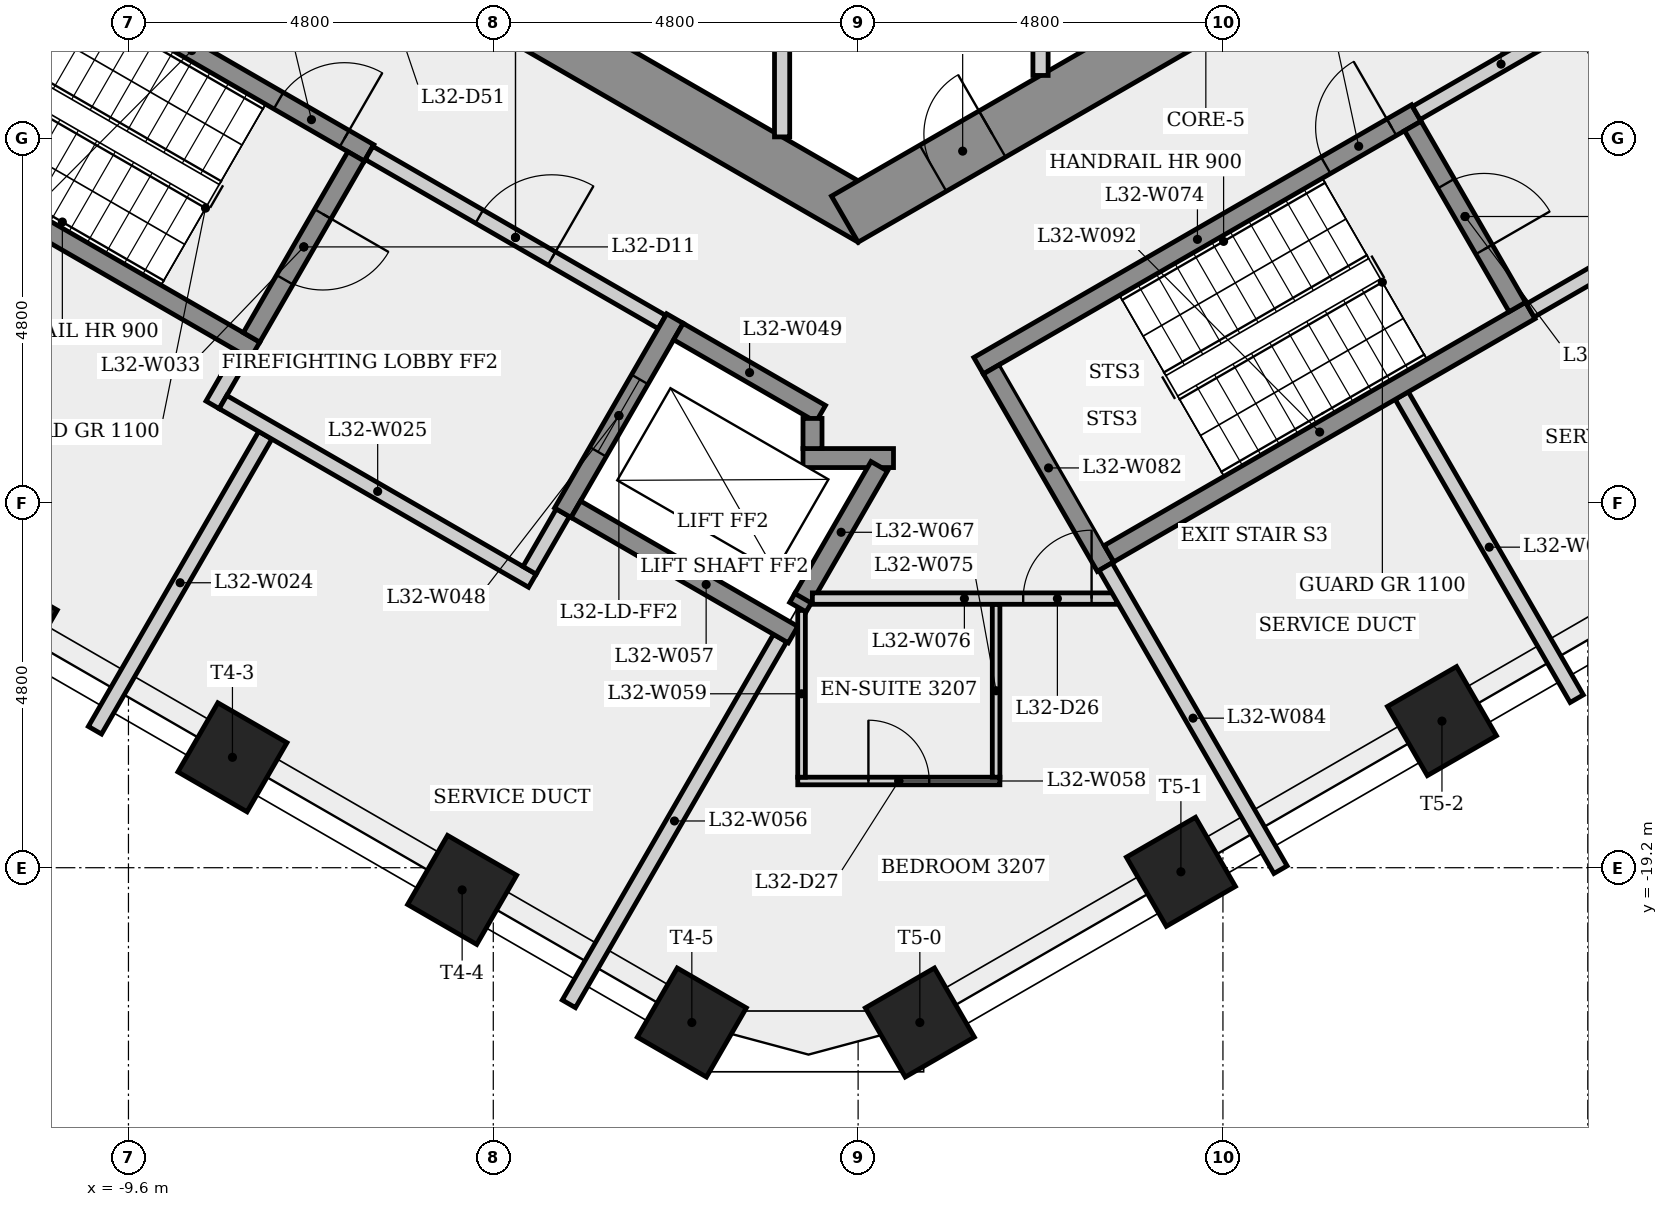
"""IFC4 building model, lengths in metres.
Left out: names, types, materials, properties, quantities, classifications, styles, units other than length and angle.
Written with IfcOpenShell. Run it as: python <this file> out.ifc"""

import sys

from ifc_helpers import new_model, si_unit, direction, frame, frame_2d, origin, origin_2d, place, context, subcontext, project, spatial, rectangle, extrude, element, fill, save


model = new_model("IFC4")
c1 = context("Model", 3, precision=1e-05, world=origin(), true_north=direction((0.0, 1.0)))
c2 = subcontext(c1, "Body", "Model", "MODEL_VIEW")
j1 = project(units=[si_unit("LENGTHUNIT", "METRE"), si_unit("PLANEANGLEUNIT", "RADIAN")], contexts=[c1])
p1 = place(None, origin())
s1 = spatial("IfcSite", under=j1, at=p1, CompositionType="ELEMENT")
p2 = place(p1, origin())
s2 = spatial("IfcBuilding", under=s1, at=p2, CompositionType="ELEMENT")
p3 = place(p2, frame((0.0, 0.0, 120.5)))
s3 = spatial("IfcBuildingStorey", under=s2, at=p3, CompositionType="ELEMENT", Elevation=120.5)
p4 = place(p3, frame((-9.325, -5.182, 0.0), z_axis=(0.0, 0.0, 1.0), x_axis=(0.866023993627, -0.500002442456, 0.0)))
e1 = element("IfcWall", 1, at=p4, inside=s3, PredefinedType="SHEAR", context=c2, shape_type="SweptSolid", body=[
    extrude(rectangle(XDim=10.97, YDim=0.7, at=frame_2d((5.485, 0.0))), origin(), (0.0, 0.0, 1.0), 4.0),
])
p5 = place(p4, frame((2.817, 0.0, 0.0)))
e2 = element("IfcOpeningElement", 2, at=p5, cuts=e1, PredefinedType="OPENING", context=c2, shape_type="SweptSolid", body=[
    extrude(rectangle(XDim=0.9, YDim=2.1, at=frame_2d((0.45, 1.05))), frame((0.0, 0.36, 0.0), z_axis=(0.0, -1.0, 0.0), x_axis=(1.0, 0.0, 0.0)), (0.0, 0.0, 1.0), 0.72),
])
p6 = place(p3, frame((-0.175, -10.667, 0.0), z_axis=(0.0, 0.0, 1.0), x_axis=(0.866023993627, 0.500002442456, 0.0)))
e3 = element("IfcWall", 3, at=p6, inside=s3, PredefinedType="SHEAR", context=c2, shape_type="SweptSolid", body=[
    extrude(rectangle(XDim=10.97, YDim=0.7, at=frame_2d((5.485, 0.0))), origin(), (0.0, 0.0, 1.0), 4.0),
])
p7 = place(p6, frame((1.34, 0.0, 0.0)))
e4 = element("IfcOpeningElement", 4, at=p7, cuts=e3, PredefinedType="OPENING", context=c2, shape_type="SweptSolid", body=[
    extrude(rectangle(XDim=0.9, YDim=2.1, at=frame_2d((0.45, 1.05))), frame((0.0, 0.36, 0.0), z_axis=(0.0, -1.0, 0.0), x_axis=(1.0, 0.0, 0.0)), (0.0, 0.0, 1.0), 0.72),
])
p8 = place(p6, frame((8.061, 0.0, 0.0)))
e5 = element("IfcOpeningElement", 5, at=p8, cuts=e3, PredefinedType="OPENING", context=c2, shape_type="SweptSolid", body=[
    extrude(rectangle(XDim=0.9, YDim=2.1, at=frame_2d((0.45, 1.05))), frame((0.0, 0.36, 0.0), z_axis=(0.0, -1.0, 0.0), x_axis=(1.0, 0.0, 0.0)), (0.0, 0.0, 1.0), 0.72),
])
for number, where, z_axis, x_axis in (
    (6, (-11.254, -16.003, 0.0), (0.0, 0.0, 1.0), (-0.5, -0.866, 0.0)),
    (7, (-8.232, -17.747, 0.0), (0.0, 0.0, 1.0), (-0.5, -0.866, 0.0)),
    (8, (-5.21, -19.492, 0.0), (0.0, 0.0, 1.0), (-0.5, -0.866, 0.0)),
    (9, (-2.188, -21.237, 0.0), (0.0, 0.0, 1.0), (-0.5, -0.866, 0.0)),
    (10, (0.812, -21.237, 0.0), (0.0, 0.0, 1.0), (0.5, -0.866, 0.0)),
    (11, (4.247, -19.254, 0.0), (0.0, 0.0, 1.0), (0.5, -0.866, 0.0)),
    (12, (7.682, -17.271, 0.0), (0.0, 0.0, 1.0), (0.5, -0.866, 0.0)),
):
    element("IfcColumn", number, at=place(p3, frame(where, z_axis=z_axis, x_axis=x_axis)), inside=s3, PredefinedType="COLUMN", context=c2, shape_type="SweptSolid", body=[
        extrude(rectangle(XDim=1.05, YDim=1.05, at=origin_2d()), origin(), (0.0, 0.0, 1.0), 4.0),
    ])
p9 = place(p3, frame((-11.1, -7.101, 0.0), z_axis=(0.0, 0.0, 1.0), x_axis=(0.866028615007, -0.499994437958, 0.0)))
e13 = element("IfcWall", 13, at=p9, inside=s3, PredefinedType="SHEAR", context=c2, shape_type="SweptSolid", body=[
    extrude(rectangle(XDim=5.387, YDim=0.25, at=frame_2d((2.694, 0.0))), origin(), (0.0, 0.0, 1.0), 3.6),
])
p10 = place(p9, frame((4.012, 0.0, 0.0)))
e14 = element("IfcOpeningElement", 14, at=p10, cuts=e13, PredefinedType="OPENING", context=c2, shape_type="SweptSolid", body=[
    extrude(rectangle(XDim=1.0, YDim=2.1, at=frame_2d((0.5, 1.05))), frame((0.0, 0.135, 0.0), z_axis=(0.0, -1.0, 0.0), x_axis=(1.0, 0.0, 0.0)), (0.0, 0.0, 1.0), 0.27),
])
p11 = place(p3, frame((-8.493, -13.11, 0.0), z_axis=(0.0, 0.0, 1.0), x_axis=(0.500067724834, 0.865986299303, 0.0)))
e15 = element("IfcWall", 15, at=p11, inside=s3, PredefinedType="PLUMBINGWALL", context=c2, shape_type="SweptSolid", body=[
    extrude(rectangle(XDim=0.775, YDim=0.2, at=frame_2d((0.388, 0.0))), origin(), (0.0, 0.0, 1.0), 3.6),
])
p12 = place(p3, frame((-7.935, -12.393, 0.0), z_axis=(0.0, 0.0, 1.0), x_axis=(-0.866025499775, 0.499999833739, 0.0)))
e16 = element("IfcWall", 16, at=p12, inside=s3, PredefinedType="SHEAR", context=c2, shape_type="SweptSolid", body=[
    extrude(rectangle(XDim=6.4, YDim=0.25, at=frame_2d((3.2, 0.0))), origin(), (0.0, 0.0, 1.0), 3.6),
])
p13 = place(p3, frame((-7.8, -13.51, 0.0), z_axis=(0.0, 0.0, 1.0), x_axis=(-0.499994393058, -0.866028640929, 0.0)))
e17 = element("IfcWall", 17, at=p13, inside=s3, PredefinedType="PLUMBINGWALL", context=c2, shape_type="SweptSolid", body=[
    extrude(rectangle(XDim=4.481, YDim=0.2, at=frame_2d((2.241, 0.0))), origin(), (0.0, 0.0, 1.0), 3.6),
])
p14 = place(p3, frame((-8.356, -13.073, 0.0), z_axis=(0.0, 0.0, 1.0), x_axis=(0.866038532462, -0.499977259774, 0.0)))
e18 = element("IfcWall", 18, at=p14, inside=s3, PredefinedType="PLUMBINGWALL", context=c2, shape_type="SweptSolid", body=[
    extrude(rectangle(XDim=4.7, YDim=0.2, at=frame_2d((2.35, 0.0))), origin(), (0.0, 0.0, 1.0), 3.6),
])
p15 = place(p3, frame((-6.605, -9.841, 0.0), z_axis=(0.0, 0.0, 1.0), x_axis=(-0.499996545922, -0.866027397988, 0.0)))
e19 = element("IfcWall", 19, at=p15, inside=s3, PredefinedType="SHEAR", context=c2, shape_type="SweptSolid", body=[
    extrude(rectangle(XDim=2.75, YDim=0.25, at=frame_2d((1.375, 0.0))), origin(), (0.0, 0.0, 1.0), 3.6),
])
p16 = place(p15, frame((0.875, 0.0, 0.0)))
e20 = element("IfcOpeningElement", 20, at=p16, cuts=e19, PredefinedType="OPENING", context=c2, shape_type="SweptSolid", body=[
    extrude(rectangle(XDim=1.0, YDim=2.1, at=frame_2d((0.5, 1.05))), frame((0.0, 0.135, 0.0), z_axis=(0.0, -1.0, 0.0), x_axis=(1.0, 0.0, 0.0)), (0.0, 0.0, 1.0), 0.27),
])
p17 = place(p3, frame((-6.435, -9.795, 0.0), z_axis=(0.0, 0.0, 1.0), x_axis=(0.866012907634, -0.500021643343, 0.0)))
e21 = element("IfcWall", 21, at=p17, inside=s3, PredefinedType="PARTITIONING", context=c2, shape_type="SweptSolid", body=[
    extrude(rectangle(XDim=4.45, YDim=0.2, at=frame_2d((2.225, 0.0))), origin(), (0.0, 0.0, 1.0), 3.6),
])
p18 = place(p17, frame((1.675, 0.0, 0.0)))
e22 = element("IfcOpeningElement", 22, at=p18, cuts=e21, PredefinedType="OPENING", context=c2, shape_type="SweptSolid", body=[
    extrude(rectangle(XDim=1.1, YDim=2.1, at=frame_2d((0.55, 1.05))), frame((0.0, 0.11, 0.0), z_axis=(0.0, -1.0, 0.0), x_axis=(1.0, 0.0, 0.0)), (0.0, 0.0, 1.0), 0.22),
])
p19 = place(p3, frame((-3.885, -14.529, 0.0), z_axis=(0.0, 0.0, 1.0), x_axis=(-0.499859285417, -0.866106630146, 0.0)))
e23 = element("IfcWall", 23, at=p19, inside=s3, PredefinedType="PLUMBINGWALL", context=c2, shape_type="SweptSolid", body=[
    extrude(rectangle(XDim=0.875, YDim=0.2, at=frame_2d((0.438, 0.0))), origin(), (0.0, 0.0, 1.0), 3.6),
])
p20 = place(p3, frame((-2.41, -11.974, 0.0), z_axis=(0.0, 0.0, 1.0), x_axis=(-0.500001826776, -0.866024349092, 0.0)))
e24 = element("IfcWall", 24, at=p20, inside=s3, PredefinedType="SHEAR", context=c2, shape_type="SweptSolid", body=[
    extrude(rectangle(XDim=2.95, YDim=0.25, at=frame_2d((1.475, 0.0))), origin(), (0.0, 0.0, 1.0), 3.6),
])
p21 = place(p20, frame((0.925, 0.0, 0.0)))
e25 = element("IfcOpeningElement", 25, at=p21, cuts=e24, PredefinedType="OPENING", context=c2, shape_type="SweptSolid", body=[
    extrude(rectangle(XDim=1.1, YDim=2.1, at=frame_2d((0.55, 1.05))), frame((0.0, 0.135, 0.0), z_axis=(0.0, -1.0, 0.0), x_axis=(1.0, 0.0, 0.0)), (0.0, 0.0, 1.0), 0.27),
])
p22 = place(p3, frame((-2.364, -12.145, 0.0), z_axis=(0.0, 0.0, 1.0), x_axis=(0.86603892542, -0.499976579108, 0.0)))
e26 = element("IfcWall", 26, at=p22, inside=s3, PredefinedType="SHEAR", context=c2, shape_type="SweptSolid", body=[
    extrude(rectangle(XDim=2.162, YDim=0.25, at=frame_2d((1.081, 0.0))), origin(), (0.0, 0.0, 1.0), 3.6),
])
p23 = place(p3, frame((-1.0, -5.275, 0.0), z_axis=(0.0, 0.0, 1.0), x_axis=(0.0, -1.0, 0.0)))
e27 = element("IfcWall", 27, at=p23, inside=s3, PredefinedType="PARTITIONING", context=c2, shape_type="SweptSolid", body=[
    extrude(rectangle(XDim=4.309, YDim=0.2, at=frame_2d((2.155, 0.0))), origin(), (0.0, 0.0, 1.0), 3.6),
])
p24 = place(p3, frame((-1.027, -16.179, 0.0), z_axis=(0.0, 0.0, 1.0), x_axis=(-0.499995019066, -0.866028279509, 0.0)))
e28 = element("IfcWall", 28, at=p24, inside=s3, PredefinedType="PLUMBINGWALL", context=c2, shape_type="SweptSolid", body=[
    extrude(rectangle(XDim=5.557, YDim=0.2, at=frame_2d((2.778, 0.0))), origin(), (0.0, 0.0, 1.0), 3.6),
])
p25 = place(p3, frame((-0.856, -16.133, 0.0), z_axis=(0.0, 0.0, 1.0), x_axis=(-0.866021716278, 0.500006386895, 0.0)))
e29 = element("IfcWall", 29, at=p25, inside=s3, PredefinedType="SHEAR", context=c2, shape_type="SweptSolid", body=[
    extrude(rectangle(XDim=3.3, YDim=0.25, at=frame_2d((1.65, 0.0))), origin(), (0.0, 0.0, 1.0), 3.6),
])
p26 = place(p3, frame((-0.794, -18.059, 0.0), z_axis=(0.0, 0.0, 1.0), x_axis=(1.0, 0.0, 0.0)))
e30 = element("IfcWall", 30, at=p26, inside=s3, PredefinedType="PARTITIONING", context=c2, shape_type="SweptSolid", body=[
    extrude(rectangle(XDim=2.66, YDim=0.1, at=frame_2d((1.33, 0.0))), origin(), (0.0, 0.0, 1.0), 3.6),
])
p27 = place(p26, frame((0.93, 0.0, 0.0)))
e31 = element("IfcOpeningElement", 31, at=p27, cuts=e30, PredefinedType="OPENING", context=c2, shape_type="SweptSolid", body=[
    extrude(rectangle(XDim=0.8, YDim=2.1, at=frame_2d((0.4, 1.05))), frame((0.0, 0.06, 0.0), z_axis=(0.0, -1.0, 0.0), x_axis=(1.0, 0.0, 0.0)), (0.0, 0.0, 1.0), 0.12),
])
p28 = place(p3, frame((-0.744, -15.814, 0.0), z_axis=(0.0, 0.0, 1.0), x_axis=(0.0, -1.0, 0.0)))
e32 = element("IfcWall", 32, at=p28, inside=s3, PredefinedType="PARTITIONING", context=c2, shape_type="SweptSolid", body=[
    extrude(rectangle(XDim=2.195, YDim=0.1, at=frame_2d((1.098, 0.0))), origin(), (0.0, 0.0, 1.0), 3.6),
])
p29 = place(p3, frame((-0.719, -15.646, 0.0), z_axis=(0.0, 0.0, 1.0), x_axis=(-0.499915430684, -0.866074224396, 0.0)))
e33 = element("IfcWall", 33, at=p29, inside=s3, PredefinedType="SHEAR", context=c2, shape_type="SweptSolid", body=[
    extrude(rectangle(XDim=0.146, YDim=0.25, at=frame_2d((0.073, 0.0))), origin(), (0.0, 0.0, 1.0), 4.0),
])
p30 = place(p3, frame((-0.725, -13.81, 0.0), z_axis=(0.0, 0.0, 1.0), x_axis=(1.0, 0.0, 0.0)))
e34 = element("IfcWall", 34, at=p30, inside=s3, PredefinedType="SHEAR", context=c2, shape_type="SweptSolid", body=[
    extrude(rectangle(XDim=1.191, YDim=0.25, at=frame_2d((0.595, 0.0))), origin(), (0.0, 0.0, 1.0), 3.6),
])
p31 = place(p3, frame((-0.6, -13.289, 0.0), z_axis=(0.0, 0.0, 1.0), x_axis=(0.0, -1.0, 0.0)))
e35 = element("IfcWall", 35, at=p31, inside=s3, PredefinedType="SHEAR", context=c2, shape_type="SweptSolid", body=[
    extrude(rectangle(XDim=0.396, YDim=0.25, at=frame_2d((0.198, 0.0))), origin(), (0.0, 0.0, 1.0), 4.0),
])
p32 = place(p3, frame((0.278, -13.918, 0.0), z_axis=(0.0, 0.0, 1.0), x_axis=(-0.499936764026, -0.866061910013, 0.0)))
e36 = element("IfcWall", 36, at=p32, inside=s3, PredefinedType="SHEAR", context=c2, shape_type="SweptSolid", body=[
    extrude(rectangle(XDim=2.005, YDim=0.25, at=frame_2d((1.002, 0.0))), origin(), (0.0, 0.0, 1.0), 4.0),
])
p33 = place(p3, frame((1.585, -12.595, 0.0), z_axis=(0.0, 0.0, 1.0), x_axis=(0.866036417653, 0.499980922934, 0.0)))
e37 = element("IfcWall", 37, at=p33, inside=s3, PredefinedType="SHEAR", context=c2, shape_type="SweptSolid", body=[
    extrude(rectangle(XDim=6.65, YDim=0.25, at=frame_2d((3.325, 0.0))), origin(), (0.0, 0.0, 1.0), 3.6),
])
p34 = place(p33, frame((5.275, 0.0, 0.0)))
e38 = element("IfcOpeningElement", 38, at=p34, cuts=e37, PredefinedType="OPENING", context=c2, shape_type="SweptSolid", body=[
    extrude(rectangle(XDim=1.0, YDim=2.1, at=frame_2d((0.5, 1.05))), frame((0.0, 0.135, 0.0), z_axis=(0.0, -1.0, 0.0), x_axis=(1.0, 0.0, 0.0)), (0.0, 0.0, 1.0), 0.27),
])
p35 = place(p3, frame((1.815, -18.009, 0.0), z_axis=(0.0, 0.0, 1.0), x_axis=(0.0, 1.0, 0.0)))
e39 = element("IfcWall", 39, at=p35, inside=s3, PredefinedType="PARTITIONING", context=c2, shape_type="SweptSolid", body=[
    extrude(rectangle(XDim=2.275, YDim=0.1, at=frame_2d((1.138, 0.0))), origin(), (0.0, 0.0, 1.0), 3.6),
])
p36 = place(p3, frame((-0.602, -15.659, 0.0), z_axis=(0.0, 0.0, 1.0), x_axis=(1.0, 0.0, 0.0)))
e40 = element("IfcWall", 40, at=p36, inside=s3, PredefinedType="PARTITIONING", context=c2, shape_type="SweptSolid", body=[
    extrude(rectangle(XDim=4.0, YDim=0.15, at=frame_2d((2.0, 0.0))), origin(), (0.0, 0.0, 1.0), 3.6),
])
p37 = place(p36, frame((2.774, 0.0, 0.0)))
e41 = element("IfcOpeningElement", 41, at=p37, cuts=e40, PredefinedType="OPENING", context=c2, shape_type="SweptSolid", body=[
    extrude(rectangle(XDim=0.9, YDim=2.1, at=frame_2d((0.45, 1.05))), frame((0.0, 0.085, 0.0), z_axis=(0.0, -1.0, 0.0), x_axis=(1.0, 0.0, 0.0)), (0.0, 0.0, 1.0), 0.17),
])
p38 = place(p3, frame((2.4, -5.275, 0.0), z_axis=(0.0, 0.0, 1.0), x_axis=(0.0, -1.0, 0.0)))
e42 = element("IfcWall", 42, at=p38, inside=s3, PredefinedType="PARTITIONING", context=c2, shape_type="SweptSolid", body=[
    extrude(rectangle(XDim=3.501, YDim=0.2, at=frame_2d((1.75, 0.0))), origin(), (0.0, 0.0, 1.0), 3.6),
])
p39 = place(p3, frame((3.256, -15.239, 0.0), z_axis=(0.0, 0.0, 1.0), x_axis=(-0.50002537861, 0.866010750942, 0.0)))
e43 = element("IfcWall", 43, at=p39, inside=s3, PredefinedType="SHEAR", context=c2, shape_type="SweptSolid", body=[
    extrude(rectangle(XDim=3.0, YDim=0.25, at=frame_2d((1.5, 0.0))), origin(), (0.0, 0.0, 1.0), 3.6),
])
for number, where, z_axis, x_axis in (
    (44, (3.256, -15.239, 0.0), (0.0, 0.0, 1.0), (0.5, -0.866, 0.0)),
    (45, (7.153, -12.989, 0.0), (0.0, 0.0, 1.0), (0.5, -0.866, 0.0)),
):
    element("IfcWall", number, at=place(p3, frame(where, z_axis=z_axis, x_axis=x_axis)), inside=s3, PredefinedType="PLUMBINGWALL", context=c2, shape_type="SweptSolid", body=[
        extrude(rectangle(XDim=4.604, YDim=0.2, at=frame_2d((2.302, 0.0))), origin(), (0.0, 0.0, 1.0), 3.6),
    ])
p40 = place(p3, frame((3.301, -15.068, 0.0), z_axis=(0.0, 0.0, 1.0), x_axis=(0.866035036182, 0.499983315828, 0.0)))
e46 = element("IfcWall", 46, at=p40, inside=s3, PredefinedType="SHEAR", context=c2, shape_type="SweptSolid", body=[
    extrude(rectangle(XDim=6.4, YDim=0.25, at=frame_2d((3.2, 0.0))), origin(), (0.0, 0.0, 1.0), 4.0),
])
p41 = place(p3, frame((7.298, -9.441, 0.0), z_axis=(0.0, 0.0, 1.0), x_axis=(0.500034990121, -0.866005201286, 0.0)))
e47 = element("IfcWall", 47, at=p41, inside=s3, PredefinedType="SHEAR", context=c2, shape_type="SweptSolid", body=[
    extrude(rectangle(XDim=2.75, YDim=0.25, at=frame_2d((1.375, 0.0))), origin(), (0.0, 0.0, 1.0), 3.6),
])
p42 = place(p41, frame((0.875, 0.0, 0.0)))
e48 = element("IfcOpeningElement", 48, at=p42, cuts=e47, PredefinedType="OPENING", context=c2, shape_type="SweptSolid", body=[
    extrude(rectangle(XDim=1.0, YDim=2.1, at=frame_2d((0.5, 1.05))), frame((0.0, 0.135, 0.0), z_axis=(0.0, -1.0, 0.0), x_axis=(1.0, 0.0, 0.0)), (0.0, 0.0, 1.0), 0.27),
])
p43 = place(p3, frame((7.344, -9.27, 0.0), z_axis=(0.0, 0.0, 1.0), x_axis=(0.866005588531, 0.500034319456, 0.0)))
e49 = element("IfcWall", 49, at=p43, inside=s3, PredefinedType="PARTITIONING", context=c2, shape_type="SweptSolid", body=[
    extrude(rectangle(XDim=2.575, YDim=0.2, at=frame_2d((1.288, 0.0))), origin(), (0.0, 0.0, 1.0), 3.6),
])
p44 = place(p3, frame((9.537, -8.119, 0.0), z_axis=(0.0, 0.0, 1.0), x_axis=(0.499990139034, -0.866031096941, 0.0)))
e50 = element("IfcWall", 50, at=p44, inside=s3, PredefinedType="PARTITIONING", context=c2, shape_type="SweptSolid", body=[
    extrude(rectangle(XDim=3.0, YDim=0.2, at=frame_2d((1.5, 0.0))), origin(), (0.0, 0.0, 1.0), 3.6),
])
p45 = place(p44, frame((0.935, 0.0, 0.0)))
e51 = element("IfcOpeningElement", 51, at=p45, cuts=e50, PredefinedType="OPENING", context=c2, shape_type="SweptSolid", body=[
    extrude(rectangle(XDim=1.0, YDim=2.1, at=frame_2d((0.5, 1.05))), frame((0.0, 0.11, 0.0), z_axis=(0.0, -1.0, 0.0), x_axis=(1.0, 0.0, 0.0)), (0.0, 0.0, 1.0), 0.22),
])
p46 = place(p3, frame((10.901, -10.681, 0.0), z_axis=(0.0, 0.0, 1.0), x_axis=(-0.866007538022, -0.500030943131, 0.0)))
e52 = element("IfcWall", 52, at=p46, inside=s3, PredefinedType="PLUMBINGWALL", context=c2, shape_type="SweptSolid", body=[
    extrude(rectangle(XDim=2.375, YDim=0.2, at=frame_2d((1.188, 0.0))), origin(), (0.0, 0.0, 1.0), 3.6),
])
p47 = place(p10, origin())
e53 = element("IfcDoor", 53, at=p47, inside=s3, OperationType="SINGLE_SWING_RIGHT", PredefinedType="DOOR", context=c2, shape_type="SweptSolid", body=[
    extrude(rectangle(XDim=1.0, YDim=2.1, at=frame_2d((0.5, 1.05))), frame((0.0, 0.025, 0.0), z_axis=(0.0, -1.0, 0.0), x_axis=(1.0, 0.0, 0.0)), (0.0, 0.0, 1.0), 0.05),
])
fill(e14, e53)
p48 = place(p16, origin())
e54 = element("IfcDoor", 54, at=p48, inside=s3, OperationType="SINGLE_SWING_LEFT", PredefinedType="DOOR", context=c2, shape_type="SweptSolid", body=[
    extrude(rectangle(XDim=1.0, YDim=2.1, at=frame_2d((0.5, 1.05))), frame((0.0, 0.025, 0.0), z_axis=(0.0, -1.0, 0.0), x_axis=(1.0, 0.0, 0.0)), (0.0, 0.0, 1.0), 0.05),
])
fill(e20, e54)
p49 = place(p18, origin())
e55 = element("IfcDoor", 55, at=p49, inside=s3, OperationType="SINGLE_SWING_RIGHT", PredefinedType="DOOR", context=c2, shape_type="SweptSolid", body=[
    extrude(rectangle(XDim=1.1, YDim=2.1, at=frame_2d((0.55, 1.05))), frame((0.0, 0.025, 0.0), z_axis=(0.0, -1.0, 0.0), x_axis=(1.0, 0.0, 0.0)), (0.0, 0.0, 1.0), 0.05),
])
fill(e22, e55)
p50 = place(p21, origin())
e56 = element("IfcDoor", 56, at=p50, inside=s3, OperationType="SLIDING_TO_LEFT", PredefinedType="DOOR", context=c2, shape_type="SweptSolid", body=[
    extrude(rectangle(XDim=1.1, YDim=2.1, at=frame_2d((0.55, 1.05))), frame((0.0, 0.025, 0.0), z_axis=(0.0, -1.0, 0.0), x_axis=(1.0, 0.0, 0.0)), (0.0, 0.0, 1.0), 0.05),
])
fill(e25, e56)
p51 = place(p34, origin())
e57 = element("IfcDoor", 57, at=p51, inside=s3, OperationType="SINGLE_SWING_RIGHT", PredefinedType="DOOR", context=c2, shape_type="SweptSolid", body=[
    extrude(rectangle(XDim=1.0, YDim=2.1, at=frame_2d((0.5, 1.05))), frame((0.0, 0.025, 0.0), z_axis=(0.0, -1.0, 0.0), x_axis=(1.0, 0.0, 0.0)), (0.0, 0.0, 1.0), 0.05),
])
fill(e38, e57)
p52 = place(p42, origin())
e58 = element("IfcDoor", 58, at=p52, inside=s3, OperationType="SINGLE_SWING_RIGHT", PredefinedType="DOOR", context=c2, shape_type="SweptSolid", body=[
    extrude(rectangle(XDim=1.0, YDim=2.1, at=frame_2d((0.5, 1.05))), frame((0.0, 0.025, 0.0), z_axis=(0.0, -1.0, 0.0), x_axis=(1.0, 0.0, 0.0)), (0.0, 0.0, 1.0), 0.05),
])
fill(e48, e58)
p53 = place(p37, origin())
e59 = element("IfcDoor", 59, at=p53, inside=s3, OperationType="SINGLE_SWING_RIGHT", PredefinedType="DOOR", context=c2, shape_type="SweptSolid", body=[
    extrude(rectangle(XDim=0.9, YDim=2.1, at=frame_2d((0.45, 1.05))), frame((0.0, 0.025, 0.0), z_axis=(0.0, -1.0, 0.0), x_axis=(1.0, 0.0, 0.0)), (0.0, 0.0, 1.0), 0.05),
])
fill(e41, e59)
p54 = place(p27, origin())
e60 = element("IfcDoor", 60, at=p54, inside=s3, OperationType="SINGLE_SWING_LEFT", PredefinedType="DOOR", context=c2, shape_type="SweptSolid", body=[
    extrude(rectangle(XDim=0.8, YDim=2.1, at=frame_2d((0.4, 1.05))), frame((0.0, 0.025, 0.0), z_axis=(0.0, -1.0, 0.0), x_axis=(1.0, 0.0, 0.0)), (0.0, 0.0, 1.0), 0.05),
])
fill(e31, e60)
p55 = place(p7, origin())
e61 = element("IfcDoor", 61, at=p55, inside=s3, OperationType="SINGLE_SWING_RIGHT", PredefinedType="DOOR", context=c2, shape_type="SweptSolid", body=[
    extrude(rectangle(XDim=0.9, YDim=2.1, at=frame_2d((0.45, 1.05))), frame((0.0, 0.025, 0.0), z_axis=(0.0, -1.0, 0.0), x_axis=(1.0, 0.0, 0.0)), (0.0, 0.0, 1.0), 0.05),
])
fill(e4, e61)
save(model, sys.argv[1])
